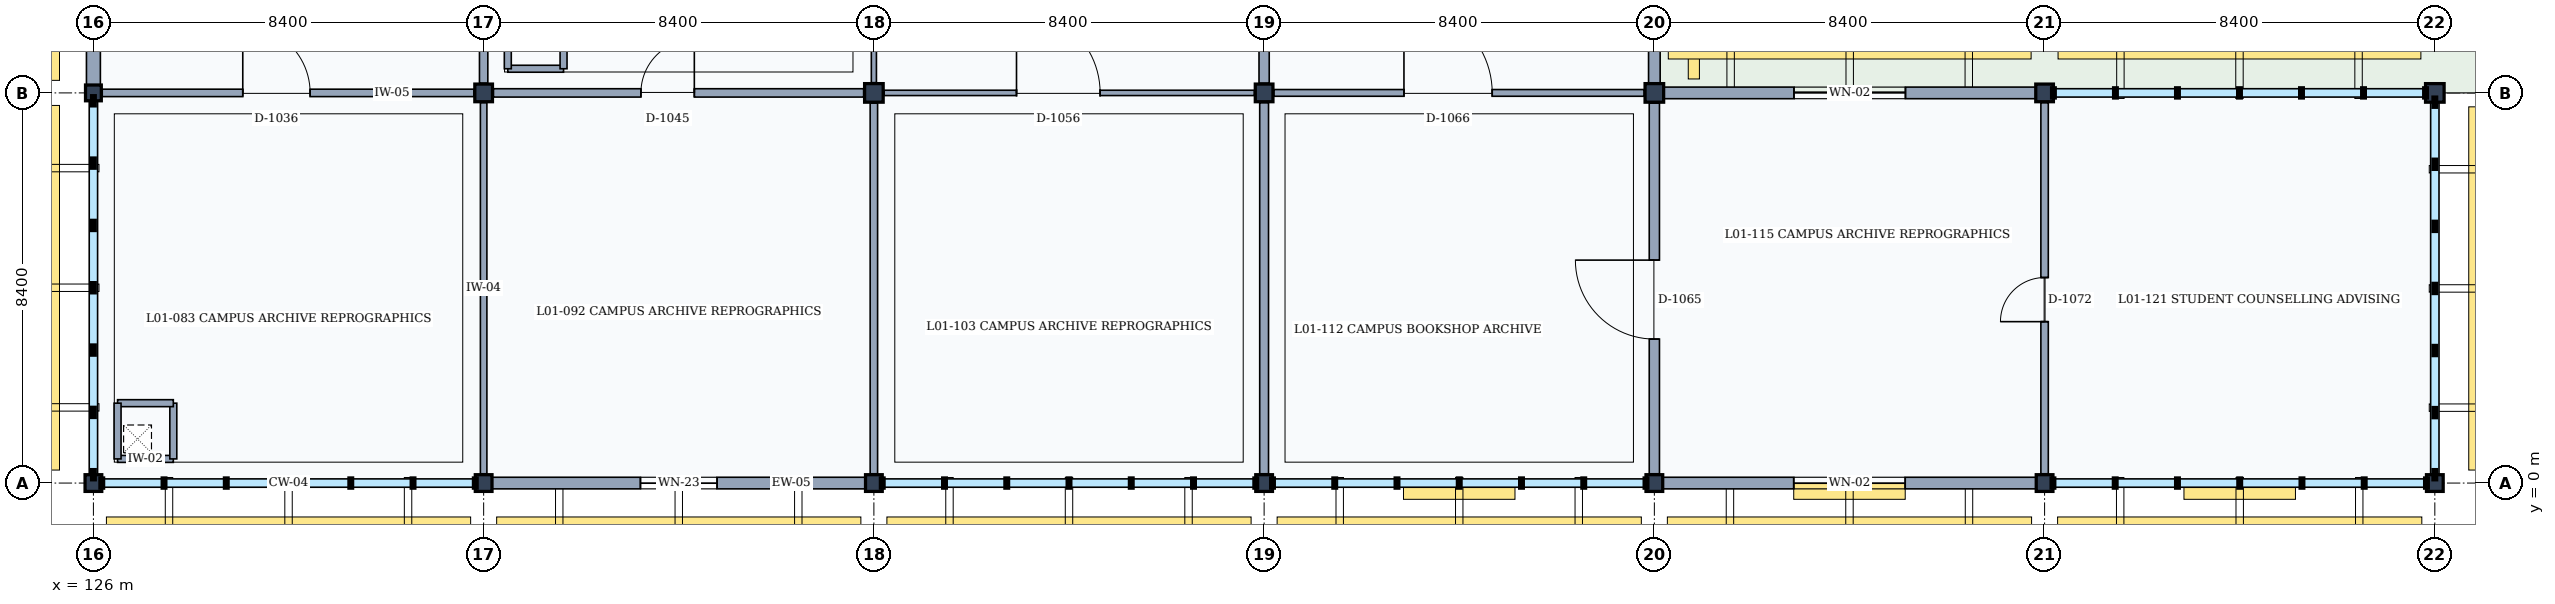
"""IFC4 building model, lengths in metres.
Left out: names, types, materials, properties, quantities, classifications, styles, units other than length and angle.
Written with IfcOpenShell. Run it as: python <this file> out.ifc"""

import sys

from ifc_helpers import new_model, si_unit, direction, frame, frame_2d, origin, origin_2d, place, context, subcontext, project, spatial, rectangle, extrude, element, fill, save


model = new_model("IFC4")
c1 = context("Model", 3, precision=1e-05, world=origin(), true_north=direction((0.0, 1.0)))
c2 = subcontext(c1, "Body", "Model", "MODEL_VIEW")
j1 = project(units=[si_unit("LENGTHUNIT", "METRE"), si_unit("PLANEANGLEUNIT", "RADIAN")], contexts=[c1])
p1 = place(None, origin())
s1 = spatial("IfcSite", under=j1, at=p1, CompositionType="ELEMENT")
p2 = place(p1, origin())
s2 = spatial("IfcBuilding", under=s1, at=p2, CompositionType="ELEMENT")
p3 = place(p2, frame((0.0, 0.0, 4.8)))
s3 = spatial("IfcBuildingStorey", under=s2, at=p3, CompositionType="ELEMENT", Elevation=4.8)
p4 = place(p3, frame((126.0, 0.0, 0.0), z_axis=(0.0, 0.0, 1.0), x_axis=(1.0, 0.0, 0.0)))
e1 = element("IfcColumn", 1, at=p4, inside=s3, PredefinedType="COLUMN", context=c2, shape_type="SweptSolid", body=[
    extrude(rectangle(XDim=0.36, YDim=0.36, at=origin_2d()), origin(), (0.0, 0.0, 1.0), 4.8),
])
p5 = place(p3, frame((126.0, 8.4, 0.0), z_axis=(0.0, 0.0, 1.0), x_axis=(1.0, 0.0, 0.0)))
e2 = element("IfcColumn", 2, at=p5, inside=s3, PredefinedType="COLUMN", context=c2, shape_type="SweptSolid", body=[
    extrude(rectangle(XDim=0.34, YDim=0.34, at=origin_2d()), origin(), (0.0, 0.0, 1.0), 4.8),
])
p6 = place(p3, frame((134.4, 0.0, 0.0), z_axis=(0.0, 0.0, 1.0), x_axis=(1.0, 0.0, 0.0)))
e3 = element("IfcColumn", 3, at=p6, inside=s3, PredefinedType="COLUMN", context=c2, shape_type="SweptSolid", body=[
    extrude(rectangle(XDim=0.36, YDim=0.36, at=origin_2d()), origin(), (0.0, 0.0, 1.0), 4.8),
])
p7 = place(p3, frame((134.4, 8.4, 0.0), z_axis=(0.0, 0.0, 1.0), x_axis=(1.0, 0.0, 0.0)))
e4 = element("IfcColumn", 4, at=p7, inside=s3, PredefinedType="COLUMN", context=c2, shape_type="SweptSolid", body=[
    extrude(rectangle(XDim=0.38, YDim=0.38, at=origin_2d()), origin(), (0.0, 0.0, 1.0), 4.8),
])
p8 = place(p3, frame((142.8, 0.0, 0.0), z_axis=(0.0, 0.0, 1.0), x_axis=(1.0, 0.0, 0.0)))
e5 = element("IfcColumn", 5, at=p8, inside=s3, PredefinedType="COLUMN", context=c2, shape_type="SweptSolid", body=[
    extrude(rectangle(XDim=0.36, YDim=0.36, at=origin_2d()), origin(), (0.0, 0.0, 1.0), 4.8),
])
p9 = place(p3, frame((142.8, 8.4, 0.0), z_axis=(0.0, 0.0, 1.0), x_axis=(1.0, 0.0, 0.0)))
e6 = element("IfcColumn", 6, at=p9, inside=s3, PredefinedType="COLUMN", context=c2, shape_type="SweptSolid", body=[
    extrude(rectangle(XDim=0.4, YDim=0.4, at=origin_2d()), origin(), (0.0, 0.0, 1.0), 4.8),
])
p10 = place(p3, frame((151.2, 0.0, 0.0), z_axis=(0.0, 0.0, 1.0), x_axis=(1.0, 0.0, 0.0)))
e7 = element("IfcColumn", 7, at=p10, inside=s3, PredefinedType="COLUMN", context=c2, shape_type="SweptSolid", body=[
    extrude(rectangle(XDim=0.36, YDim=0.36, at=origin_2d()), origin(), (0.0, 0.0, 1.0), 4.8),
])
p11 = place(p3, frame((151.2, 8.4, 0.0), z_axis=(0.0, 0.0, 1.0), x_axis=(1.0, 0.0, 0.0)))
e8 = element("IfcColumn", 8, at=p11, inside=s3, PredefinedType="COLUMN", context=c2, shape_type="SweptSolid", body=[
    extrude(rectangle(XDim=0.38, YDim=0.38, at=origin_2d()), origin(), (0.0, 0.0, 1.0), 4.8),
])
p12 = place(p3, frame((159.6, 0.0, 0.0), z_axis=(0.0, 0.0, 1.0), x_axis=(1.0, 0.0, 0.0)))
e9 = element("IfcColumn", 9, at=p12, inside=s3, PredefinedType="COLUMN", context=c2, shape_type="SweptSolid", body=[
    extrude(rectangle(XDim=0.36, YDim=0.36, at=origin_2d()), origin(), (0.0, 0.0, 1.0), 4.8),
])
p13 = place(p3, frame((159.6, 8.4, 0.0), z_axis=(0.0, 0.0, 1.0), x_axis=(1.0, 0.0, 0.0)))
e10 = element("IfcColumn", 10, at=p13, inside=s3, PredefinedType="COLUMN", context=c2, shape_type="SweptSolid", body=[
    extrude(rectangle(XDim=0.4, YDim=0.4, at=origin_2d()), origin(), (0.0, 0.0, 1.0), 4.8),
])
p14 = place(p3, frame((168.0, 0.0, 0.0), z_axis=(0.0, 0.0, 1.0), x_axis=(1.0, 0.0, 0.0)))
e11 = element("IfcColumn", 11, at=p14, inside=s3, PredefinedType="COLUMN", context=c2, shape_type="SweptSolid", body=[
    extrude(rectangle(XDim=0.36, YDim=0.36, at=origin_2d()), origin(), (0.0, 0.0, 1.0), 4.8),
])
p15 = place(p3, frame((168.0, 8.4, 0.0), z_axis=(0.0, 0.0, 1.0), x_axis=(1.0, 0.0, 0.0)))
e12 = element("IfcColumn", 12, at=p15, inside=s3, PredefinedType="COLUMN", context=c2, shape_type="SweptSolid", body=[
    extrude(rectangle(XDim=0.38, YDim=0.38, at=origin_2d()), origin(), (0.0, 0.0, 1.0), 4.8),
])
p16 = place(p3, frame((176.4, 0.0, 0.0), z_axis=(0.0, 0.0, 1.0), x_axis=(1.0, 0.0, 0.0)))
e13 = element("IfcColumn", 13, at=p16, inside=s3, PredefinedType="COLUMN", context=c2, shape_type="SweptSolid", body=[
    extrude(rectangle(XDim=0.36, YDim=0.36, at=origin_2d()), origin(), (0.0, 0.0, 1.0), 4.8),
])
p17 = place(p3, frame((176.4, 8.4, 0.0), z_axis=(0.0, 0.0, 1.0), x_axis=(1.0, 0.0, 0.0)))
e14 = element("IfcColumn", 14, at=p17, inside=s3, PredefinedType="COLUMN", context=c2, shape_type="SweptSolid", body=[
    extrude(rectangle(XDim=0.4, YDim=0.4, at=origin_2d()), origin(), (0.0, 0.0, 1.0), 4.8),
])
p18 = place(p3, frame((126.0, 8.57, 0.0), z_axis=(0.0, 0.0, 1.0), x_axis=(0.0, 1.0, 0.0)))
e15 = element("IfcWall", 15, at=p18, inside=s3, PredefinedType="SOLIDWALL", context=c2, shape_type="SweptSolid", body=[
    extrude(rectangle(XDim=8.05, YDim=0.3, at=frame_2d((4.025, 0.0))), origin(), (0.0, 0.0, 1.0), 3.96),
])
p19 = place(p18, frame((3.4, 0.0, 0.9)))
e16 = element("IfcOpeningElement", 16, at=p19, cuts=e15, PredefinedType="OPENING", context=c2, shape_type="SweptSolid", body=[
    extrude(rectangle(XDim=1.25, YDim=1.7, at=frame_2d((0.625, 0.85))), frame((0.0, 0.16, 0.0), z_axis=(0.0, -1.0, 0.0), x_axis=(1.0, 0.0, 0.0)), (0.0, 0.0, 1.0), 0.32),
])
p20 = place(p3, frame((142.62, 0.0, 0.0), z_axis=(0.0, 0.0, 1.0), x_axis=(-1.0, 0.0, 0.0)))
e17 = element("IfcWall", 17, at=p20, inside=s3, PredefinedType="SOLIDWALL", context=c2, shape_type="SweptSolid", body=[
    extrude(rectangle(XDim=8.04, YDim=0.25, at=frame_2d((4.02, 0.0))), origin(), (0.0, 0.0, 1.0), 3.96),
])
p21 = place(p20, frame((3.195, 0.0, 0.9)))
e18 = element("IfcOpeningElement", 18, at=p21, cuts=e17, PredefinedType="OPENING", context=c2, shape_type="SweptSolid", body=[
    extrude(rectangle(XDim=1.65, YDim=1.9, at=frame_2d((0.825, 0.95))), frame((0.0, 0.135, 0.0), z_axis=(0.0, -1.0, 0.0), x_axis=(1.0, 0.0, 0.0)), (0.0, 0.0, 1.0), 0.27),
])
p22 = place(p3, frame((159.6, 16.6, 0.0), z_axis=(0.0, 0.0, 1.0), x_axis=(0.0, -1.0, 0.0)))
e19 = element("IfcWall", 19, at=p22, inside=s3, PredefinedType="SOLIDWALL", context=c2, shape_type="SweptSolid", body=[
    extrude(rectangle(XDim=8.0, YDim=0.25, at=frame_2d((4.0, 0.0))), origin(), (0.0, 0.0, 1.0), 3.96),
])
p23 = place(p22, frame((2.55, 0.0, 0.9)))
e20 = element("IfcOpeningElement", 20, at=p23, cuts=e19, PredefinedType="OPENING", context=c2, shape_type="SweptSolid", body=[
    extrude(rectangle(XDim=2.9, YDim=1.75, at=frame_2d((1.45, 0.875))), frame((0.0, 0.135, 0.0), z_axis=(0.0, -1.0, 0.0), x_axis=(1.0, 0.0, 0.0)), (0.0, 0.0, 1.0), 0.27),
])
p24 = place(p3, frame((167.82, 0.0, 0.0), z_axis=(0.0, 0.0, 1.0), x_axis=(-1.0, 0.0, 0.0)))
e21 = element("IfcWall", 21, at=p24, inside=s3, PredefinedType="SOLIDWALL", context=c2, shape_type="SweptSolid", body=[
    extrude(rectangle(XDim=8.04, YDim=0.25, at=frame_2d((4.02, 0.0))), origin(), (0.0, 0.0, 1.0), 3.96),
])
p25 = place(p24, frame((2.82, 0.0, 0.9)))
e22 = element("IfcOpeningElement", 22, at=p25, cuts=e21, PredefinedType="OPENING", context=c2, shape_type="SweptSolid", body=[
    extrude(rectangle(XDim=2.4, YDim=1.8, at=frame_2d((1.2, 0.9))), frame((0.0, 0.135, 0.0), z_axis=(0.0, -1.0, 0.0), x_axis=(1.0, 0.0, 0.0)), (0.0, 0.0, 1.0), 0.27),
])
p26 = place(p3, frame((159.8, 8.4, 0.0), z_axis=(0.0, 0.0, 1.0), x_axis=(1.0, 0.0, 0.0)))
e23 = element("IfcWall", 23, at=p26, inside=s3, PredefinedType="SOLIDWALL", context=c2, shape_type="SweptSolid", body=[
    extrude(rectangle(XDim=8.01, YDim=0.25, at=frame_2d((4.005, 0.0))), origin(), (0.0, 0.0, 1.0), 3.93),
])
p27 = place(p26, frame((2.805, 0.0, 0.9)))
e24 = element("IfcOpeningElement", 24, at=p27, cuts=e23, PredefinedType="OPENING", context=c2, shape_type="SweptSolid", body=[
    extrude(rectangle(XDim=2.4, YDim=1.8, at=frame_2d((1.2, 0.9))), frame((0.0, 0.135, 0.0), z_axis=(0.0, -1.0, 0.0), x_axis=(1.0, 0.0, 0.0)), (0.0, 0.0, 1.0), 0.27),
])
for number, where, z_axis, x_axis in (
    (25, (126.52, 0.52, 0.0), (0.0, 0.0, 1.0), (1.0, 0.0, 0.0)),
    (26, (127.72, 0.52, 0.0), (0.0, 0.0, 1.0), (0.0, 1.0, 0.0)),
    (27, (127.72, 1.72, 0.0), (0.0, 0.0, 1.0), (-1.0, 0.0, 0.0)),
    (28, (126.52, 1.72, 0.0), (0.0, 0.0, 1.0), (0.0, -1.0, 0.0)),
):
    element("IfcWall", number, at=place(p3, frame(where, z_axis=z_axis, x_axis=x_axis)), inside=s3, PredefinedType="PARTITIONING", context=c2, shape_type="SweptSolid", body=[
        extrude(rectangle(XDim=1.2, YDim=0.15, at=frame_2d((0.6, 0.0))), origin(), (0.0, 0.0, 1.0), 4.53),
    ])
for number, where, z_axis, x_axis in (
    (29, (134.92, 8.92, 0.0), (0.0, 0.0, 1.0), (1.0, 0.0, 0.0)),
    (30, (136.12, 8.92, 0.0), (0.0, 0.0, 1.0), (0.0, 1.0, 0.0)),
    (31, (134.92, 10.12, 0.0), (0.0, 0.0, 1.0), (0.0, -1.0, 0.0)),
):
    element("IfcWall", number, at=place(p3, frame(where, z_axis=z_axis, x_axis=x_axis)), inside=s3, PredefinedType="PARTITIONING", context=c2, shape_type="SweptSolid", body=[
        extrude(rectangle(XDim=1.2, YDim=0.15, at=frame_2d((0.6, 0.0))), origin(), (0.0, 0.0, 1.0), 4.55),
    ])
p28 = place(p3, frame((134.4, 0.2, 0.0), z_axis=(0.0, 0.0, 1.0), x_axis=(0.0, 1.0, 0.0)))
e32 = element("IfcWall", 32, at=p28, inside=s3, PredefinedType="PARTITIONING", context=c2, shape_type="SweptSolid", body=[
    extrude(rectangle(XDim=7.99, YDim=0.14, at=frame_2d((3.995, 0.0))), origin(), (0.0, 0.0, 1.0), 3.92),
])
p29 = place(p3, frame((126.19, 8.4, 0.0), z_axis=(0.0, 0.0, 1.0), x_axis=(1.0, 0.0, 0.0)))
e33 = element("IfcWall", 33, at=p29, inside=s3, PredefinedType="PARTITIONING", context=c2, shape_type="SweptSolid", body=[
    extrude(rectangle(XDim=8.0, YDim=0.16, at=frame_2d((4.0, 0.0))), origin(), (0.0, 0.0, 1.0), 3.89),
])
p30 = place(p29, frame((3.025, 0.0, 0.0)))
e34 = element("IfcOpeningElement", 34, at=p30, cuts=e33, PredefinedType="OPENING", context=c2, shape_type="SweptSolid", body=[
    extrude(rectangle(XDim=1.45, YDim=2.35, at=frame_2d((0.725, 1.175))), frame((0.0, 0.09, 0.0), z_axis=(0.0, -1.0, 0.0), x_axis=(1.0, 0.0, 0.0)), (0.0, 0.0, 1.0), 0.18),
])
p31 = place(p3, frame((134.4, 8.61, 0.0), z_axis=(0.0, 0.0, 1.0), x_axis=(0.0, 1.0, 0.0)))
e35 = element("IfcWall", 35, at=p31, inside=s3, PredefinedType="PARTITIONING", context=c2, shape_type="SweptSolid", body=[
    extrude(rectangle(XDim=7.98, YDim=0.18, at=frame_2d((3.99, 0.0))), origin(), (0.0, 0.0, 1.0), 3.92),
])
p32 = place(p3, frame((142.8, 0.2, 0.0), z_axis=(0.0, 0.0, 1.0), x_axis=(0.0, 1.0, 0.0)))
e36 = element("IfcWall", 36, at=p32, inside=s3, PredefinedType="PARTITIONING", context=c2, shape_type="SweptSolid", body=[
    extrude(rectangle(XDim=7.98, YDim=0.16, at=frame_2d((3.99, 0.0))), origin(), (0.0, 0.0, 1.0), 3.92),
])
p33 = place(p3, frame((134.61, 8.4, 0.0), z_axis=(0.0, 0.0, 1.0), x_axis=(1.0, 0.0, 0.0)))
e37 = element("IfcWall", 37, at=p33, inside=s3, PredefinedType="PARTITIONING", context=c2, shape_type="SweptSolid", body=[
    extrude(rectangle(XDim=7.97, YDim=0.18, at=frame_2d((3.985, 0.0))), origin(), (0.0, 0.0, 1.0), 3.89),
])
p34 = place(p33, frame((3.175, 0.0, 0.0)))
e38 = element("IfcOpeningElement", 38, at=p34, cuts=e37, PredefinedType="OPENING", context=c2, shape_type="SweptSolid", body=[
    extrude(rectangle(XDim=1.15, YDim=2.25, at=frame_2d((0.575, 1.125))), frame((0.0, 0.1, 0.0), z_axis=(0.0, -1.0, 0.0), x_axis=(1.0, 0.0, 0.0)), (0.0, 0.0, 1.0), 0.2),
])
p35 = place(p3, frame((142.8, 8.62, 0.0), z_axis=(0.0, 0.0, 1.0), x_axis=(0.0, 1.0, 0.0)))
e39 = element("IfcWall", 39, at=p35, inside=s3, PredefinedType="PARTITIONING", context=c2, shape_type="SweptSolid", body=[
    extrude(rectangle(XDim=7.96, YDim=0.11, at=frame_2d((3.98, 0.0))), origin(), (0.0, 0.0, 1.0), 3.92),
])
p36 = place(p3, frame((151.2, 0.2, 0.0), z_axis=(0.0, 0.0, 1.0), x_axis=(0.0, 1.0, 0.0)))
e40 = element("IfcWall", 40, at=p36, inside=s3, PredefinedType="PARTITIONING", context=c2, shape_type="SweptSolid", body=[
    extrude(rectangle(XDim=7.99, YDim=0.19, at=frame_2d((3.995, 0.0))), origin(), (0.0, 0.0, 1.0), 3.92),
])
p37 = place(p3, frame((143.02, 8.4, 0.0), z_axis=(0.0, 0.0, 1.0), x_axis=(1.0, 0.0, 0.0)))
e41 = element("IfcWall", 41, at=p37, inside=s3, PredefinedType="PARTITIONING", context=c2, shape_type="SweptSolid", body=[
    extrude(rectangle(XDim=7.97, YDim=0.115, at=frame_2d((3.985, 0.0))), origin(), (0.0, 0.0, 1.0), 3.92),
])
p38 = place(p37, frame((2.85, 0.0, 0.0)))
e42 = element("IfcOpeningElement", 42, at=p38, cuts=e41, PredefinedType="OPENING", context=c2, shape_type="SweptSolid", body=[
    extrude(rectangle(XDim=1.8, YDim=2.3, at=frame_2d((0.9, 1.15))), frame((0.0, 0.067, 0.0), z_axis=(0.0, -1.0, 0.0), x_axis=(1.0, 0.0, 0.0)), (0.0, 0.0, 1.0), 0.135),
])
p39 = place(p3, frame((151.2, 8.61, 0.0), z_axis=(0.0, 0.0, 1.0), x_axis=(0.0, 1.0, 0.0)))
e43 = element("IfcWall", 43, at=p39, inside=s3, PredefinedType="PARTITIONING", context=c2, shape_type="SweptSolid", body=[
    extrude(rectangle(XDim=7.98, YDim=0.22, at=frame_2d((3.99, 0.0))), origin(), (0.0, 0.0, 1.0), 3.92),
])
p40 = place(p3, frame((159.6, 0.2, 0.0), z_axis=(0.0, 0.0, 1.0), x_axis=(0.0, 1.0, 0.0)))
e44 = element("IfcWall", 44, at=p40, inside=s3, PredefinedType="PARTITIONING", context=c2, shape_type="SweptSolid", body=[
    extrude(rectangle(XDim=7.98, YDim=0.22, at=frame_2d((3.99, 0.0))), origin(), (0.0, 0.0, 1.0), 3.92),
])
p41 = place(p40, frame((2.9, 0.0, 0.0)))
e45 = element("IfcOpeningElement", 45, at=p41, cuts=e44, PredefinedType="OPENING", context=c2, shape_type="SweptSolid", body=[
    extrude(rectangle(XDim=1.7, YDim=2.3, at=frame_2d((0.85, 1.15))), frame((0.0, 0.12, 0.0), z_axis=(0.0, -1.0, 0.0), x_axis=(1.0, 0.0, 0.0)), (0.0, 0.0, 1.0), 0.24),
])
p42 = place(p3, frame((151.41, 8.4, 0.0), z_axis=(0.0, 0.0, 1.0), x_axis=(1.0, 0.0, 0.0)))
e46 = element("IfcWall", 46, at=p42, inside=s3, PredefinedType="PARTITIONING", context=c2, shape_type="SweptSolid", body=[
    extrude(rectangle(XDim=7.97, YDim=0.145, at=frame_2d((3.985, 0.0))), origin(), (0.0, 0.0, 1.0), 3.92),
])
p43 = place(p42, frame((2.8, 0.0, 0.0)))
e47 = element("IfcOpeningElement", 47, at=p43, cuts=e46, PredefinedType="OPENING", context=c2, shape_type="SweptSolid", body=[
    extrude(rectangle(XDim=1.9, YDim=2.4, at=frame_2d((0.95, 1.2))), frame((0.0, 0.083, 0.0), z_axis=(0.0, -1.0, 0.0), x_axis=(1.0, 0.0, 0.0)), (0.0, 0.0, 1.0), 0.165),
])
p44 = place(p3, frame((168.0, 0.2, 0.0), z_axis=(0.0, 0.0, 1.0), x_axis=(0.0, 1.0, 0.0)))
e48 = element("IfcWall", 48, at=p44, inside=s3, PredefinedType="PARTITIONING", context=c2, shape_type="SweptSolid", body=[
    extrude(rectangle(XDim=7.99, YDim=0.16, at=frame_2d((3.995, 0.0))), origin(), (0.0, 0.0, 1.0), 3.92),
])
p45 = place(p44, frame((3.275, 0.0, 0.0)))
e49 = element("IfcOpeningElement", 49, at=p45, cuts=e48, PredefinedType="OPENING", context=c2, shape_type="SweptSolid", body=[
    extrude(rectangle(XDim=0.95, YDim=2.15, at=frame_2d((0.475, 1.075))), frame((0.0, 0.09, 0.0), z_axis=(0.0, -1.0, 0.0), x_axis=(1.0, 0.0, 0.0)), (0.0, 0.0, 1.0), 0.18),
])
p46 = place(p21, origin())
e50 = element("IfcWindow", 50, at=p46, inside=s3, PartitioningType="SINGLE_PANEL", PredefinedType="WINDOW", context=c2, shape_type="SweptSolid", body=[
    extrude(rectangle(XDim=1.65, YDim=1.9, at=frame_2d((0.825, 0.95))), frame((0.0, 0.03, 0.0), z_axis=(0.0, -1.0, 0.0), x_axis=(1.0, 0.0, 0.0)), (0.0, 0.0, 1.0), 0.06),
])
fill(e18, e50)
p47 = place(p25, origin())
e51 = element("IfcWindow", 51, at=p47, inside=s3, PartitioningType="SINGLE_PANEL", PredefinedType="WINDOW", context=c2, shape_type="SweptSolid", body=[
    extrude(rectangle(XDim=2.4, YDim=1.8, at=frame_2d((1.2, 0.9))), frame((0.0, 0.03, 0.0), z_axis=(0.0, -1.0, 0.0), x_axis=(1.0, 0.0, 0.0)), (0.0, 0.0, 1.0), 0.06),
])
fill(e22, e51)
p48 = place(p27, origin())
e52 = element("IfcWindow", 52, at=p48, inside=s3, PartitioningType="SINGLE_PANEL", PredefinedType="WINDOW", context=c2, shape_type="SweptSolid", body=[
    extrude(rectangle(XDim=2.4, YDim=1.8, at=frame_2d((1.2, 0.9))), frame((0.0, 0.03, 0.0), z_axis=(0.0, -1.0, 0.0), x_axis=(1.0, 0.0, 0.0)), (0.0, 0.0, 1.0), 0.06),
])
fill(e24, e52)
p49 = place(p30, origin())
e53 = element("IfcDoor", 53, at=p49, inside=s3, OperationType="SINGLE_SWING_LEFT", PredefinedType="DOOR", context=c2, shape_type="SweptSolid", body=[
    extrude(rectangle(XDim=1.45, YDim=2.35, at=frame_2d((0.725, 1.175))), frame((0.0, 0.025, 0.0), z_axis=(0.0, -1.0, 0.0), x_axis=(1.0, 0.0, 0.0)), (0.0, 0.0, 1.0), 0.05),
])
fill(e34, e53)
p50 = place(p34, origin())
e54 = element("IfcDoor", 54, at=p50, inside=s3, OperationType="SINGLE_SWING_RIGHT", PredefinedType="DOOR", context=c2, shape_type="SweptSolid", body=[
    extrude(rectangle(XDim=1.15, YDim=2.25, at=frame_2d((0.575, 1.125))), frame((0.0, 0.025, 0.0), z_axis=(0.0, -1.0, 0.0), x_axis=(1.0, 0.0, 0.0)), (0.0, 0.0, 1.0), 0.05),
])
fill(e38, e54)
p51 = place(p38, origin())
e55 = element("IfcDoor", 55, at=p51, inside=s3, OperationType="SINGLE_SWING_LEFT", PredefinedType="DOOR", context=c2, shape_type="SweptSolid", body=[
    extrude(rectangle(XDim=1.8, YDim=2.3, at=frame_2d((0.9, 1.15))), frame((0.0, 0.025, 0.0), z_axis=(0.0, -1.0, 0.0), x_axis=(1.0, 0.0, 0.0)), (0.0, 0.0, 1.0), 0.05),
])
fill(e42, e55)
p52 = place(p41, origin())
e56 = element("IfcDoor", 56, at=p52, inside=s3, OperationType="SINGLE_SWING_RIGHT", PredefinedType="DOOR", context=c2, shape_type="SweptSolid", body=[
    extrude(rectangle(XDim=1.7, YDim=2.3, at=frame_2d((0.85, 1.15))), frame((0.0, 0.025, 0.0), z_axis=(0.0, -1.0, 0.0), x_axis=(1.0, 0.0, 0.0)), (0.0, 0.0, 1.0), 0.05),
])
fill(e45, e56)
p53 = place(p43, origin())
e57 = element("IfcDoor", 57, at=p53, inside=s3, OperationType="SINGLE_SWING_LEFT", PredefinedType="DOOR", context=c2, shape_type="SweptSolid", body=[
    extrude(rectangle(XDim=1.9, YDim=2.4, at=frame_2d((0.95, 1.2))), frame((0.0, 0.025, 0.0), z_axis=(0.0, -1.0, 0.0), x_axis=(1.0, 0.0, 0.0)), (0.0, 0.0, 1.0), 0.05),
])
fill(e47, e57)
p54 = place(p45, origin())
e58 = element("IfcDoor", 58, at=p54, inside=s3, OperationType="SINGLE_SWING_LEFT", PredefinedType="DOOR", context=c2, shape_type="SweptSolid", body=[
    extrude(rectangle(XDim=0.95, YDim=2.15, at=frame_2d((0.475, 1.075))), frame((0.0, 0.025, 0.0), z_axis=(0.0, -1.0, 0.0), x_axis=(1.0, 0.0, 0.0)), (0.0, 0.0, 1.0), 0.05),
])
fill(e49, e58)
save(model, sys.argv[1])
